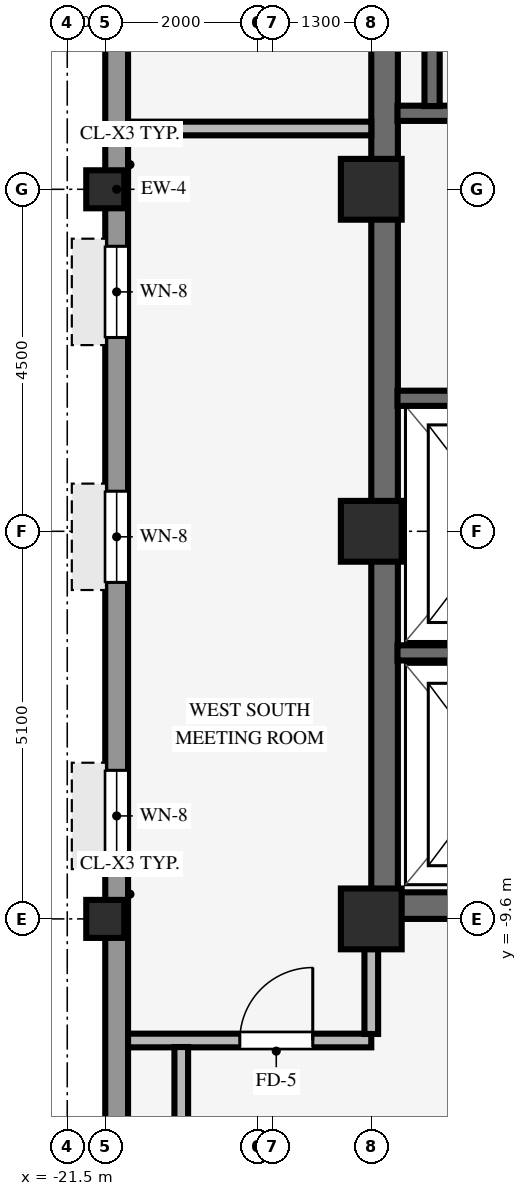
"""IFC4 building model, lengths in metres.
Left out: names, types, materials, properties, quantities, classifications, styles, units other than length and angle.
Written with IfcOpenShell. Run it as: python <this file> out.ifc"""

import sys

from ifc_helpers import new_model, si_unit, direction, frame, frame_2d, origin, origin_2d, place, context, subcontext, project, spatial, rectangle, hollow_rectangle, extrude, source, transform, mapped, element, fill, save


model = new_model("IFC4")
c1 = context("Model", 3, precision=1e-05, world=origin(), true_north=direction((0.0, 1.0)))
c2 = subcontext(c1, "Body", "Model", "MODEL_VIEW")
j1 = project(units=[si_unit("LENGTHUNIT", "METRE"), si_unit("PLANEANGLEUNIT", "RADIAN")], contexts=[c1])
p1 = place(None, origin())
s1 = spatial("IfcSite", under=j1, at=p1, CompositionType="ELEMENT")
p2 = place(p1, origin())
s2 = spatial("IfcBuilding", under=s1, at=p2, CompositionType="ELEMENT")
p3 = place(p2, frame((0.0, 0.0, 279.85)))
s3 = spatial("IfcBuildingStorey", under=s2, at=p3, CompositionType="ELEMENT", Elevation=279.85)
p4 = place(p3, frame((-17.5, -9.425, 0.0), z_axis=(0.0, 0.0, 1.0), x_axis=(1.0, 0.0, 0.0)))
e1 = element("IfcWall", 1, at=p4, inside=s3, PredefinedType="SHEAR", context=c2, shape_type="SweptSolid", body=[
    extrude(rectangle(XDim=8.5, YDim=0.35, at=frame_2d((4.25, 0.0))), origin(), (0.0, 0.0, 1.0), 3.37),
])
p5 = place(p3, frame((-17.325, -9.255, 0.0), z_axis=(0.0, 0.0, 1.0), x_axis=(0.0, 1.0, 0.0)))
e2 = element("IfcWall", 2, at=p5, inside=s3, PredefinedType="SHEAR", context=c2, shape_type="SweptSolid", body=[
    extrude(rectangle(XDim=18.51, YDim=0.35, at=frame_2d((9.255, 0.0))), origin(), (0.0, 0.0, 1.0), 3.37),
])
for number, where, z_axis, x_axis in (
    (3, (-17.5, -9.6, 0.0), (0.0, 0.0, 1.0), (1.0, 0.0, 0.0)),
    (4, (-17.5, -4.5, 0.0), (0.0, 0.0, 1.0), (1.0, 0.0, 0.0)),
    (5, (-17.5, 0.0, 0.0), (0.0, 0.0, 1.0), (1.0, 0.0, 0.0)),
):
    element("IfcColumn", number, at=place(p3, frame(where, z_axis=z_axis, x_axis=x_axis)), inside=s3, PredefinedType="COLUMN", context=c2, shape_type="SweptSolid", body=[
        extrude(rectangle(XDim=0.8, YDim=0.8, at=origin_2d()), origin(), (0.0, 0.0, 1.0), 3.37),
    ])
for number, where, z_axis, x_axis in (
    (6, (-21.0, -9.6, 0.0), (0.0, 0.0, 1.0), (1.0, 0.0, 0.0)),
    (7, (-21.0, 0.0, 0.0), (0.0, 0.0, 1.0), (1.0, 0.0, 0.0)),
):
    element("IfcColumn", number, at=place(p3, frame(where, z_axis=z_axis, x_axis=x_axis)), inside=s3, PredefinedType="COLUMN", context=c2, shape_type="SweptSolid", body=[
        extrude(hollow_rectangle(XDim=0.5, YDim=0.5, WallThickness=0.032, InnerFilletRadius=0.032, OuterFilletRadius=0.064, at=origin_2d()), origin(), (0.0, 0.0, 1.0), 3.37),
    ])
p6 = place(p3, frame((-20.85, -17.004, 0.0), z_axis=(0.0, 0.0, 1.0), x_axis=(0.0, 1.0, 0.0)))
e8 = element("IfcWall", 8, at=p6, inside=s3, PredefinedType="STANDARD", context=c2, shape_type="SweptSolid", body=[
    extrude(rectangle(XDim=34.008, YDim=0.3, at=frame_2d((17.004, 0.0))), origin(), (0.0, 0.0, 1.0), 2.705),
])
p7 = place(p6, frame((1.786, 0.0, 0.8)))
e9 = element("IfcOpeningElement", 9, at=p7, cuts=e8, PredefinedType="OPENING", context=c2, shape_type="SweptSolid", body=[
    extrude(rectangle(XDim=1.2, YDim=1.48, at=frame_2d((0.6, 0.74))), frame((0.0, 0.16, 0.0), z_axis=(0.0, -1.0, 0.0), x_axis=(1.0, 0.0, 0.0)), (0.0, 0.0, 1.0), 0.32),
])
p8 = place(p6, frame((8.159, 0.0, 0.8)))
e10 = element("IfcOpeningElement", 10, at=p8, cuts=e8, PredefinedType="OPENING", context=c2, shape_type="SweptSolid", body=[
    extrude(rectangle(XDim=1.2, YDim=1.48, at=frame_2d((0.6, 0.74))), frame((0.0, 0.16, 0.0), z_axis=(0.0, -1.0, 0.0), x_axis=(1.0, 0.0, 0.0)), (0.0, 0.0, 1.0), 0.32),
])
p9 = place(p6, frame((11.831, 0.0, 0.8)))
e11 = element("IfcOpeningElement", 11, at=p9, cuts=e8, PredefinedType="OPENING", context=c2, shape_type="SweptSolid", body=[
    extrude(rectangle(XDim=1.2, YDim=1.48, at=frame_2d((0.6, 0.74))), frame((0.0, 0.16, 0.0), z_axis=(0.0, -1.0, 0.0), x_axis=(1.0, 0.0, 0.0)), (0.0, 0.0, 1.0), 0.32),
])
p10 = place(p6, frame((15.054, 0.0, 0.8)))
e12 = element("IfcOpeningElement", 12, at=p10, cuts=e8, PredefinedType="OPENING", context=c2, shape_type="SweptSolid", body=[
    extrude(rectangle(XDim=1.2, YDim=1.48, at=frame_2d((0.6, 0.74))), frame((0.0, 0.16, 0.0), z_axis=(0.0, -1.0, 0.0), x_axis=(1.0, 0.0, 0.0)), (0.0, 0.0, 1.0), 0.32),
])
p11 = place(p6, frame((20.977, 0.0, 0.8)))
e13 = element("IfcOpeningElement", 13, at=p11, cuts=e8, PredefinedType="OPENING", context=c2, shape_type="SweptSolid", body=[
    extrude(rectangle(XDim=1.2, YDim=1.48, at=frame_2d((0.6, 0.74))), frame((0.0, 0.16, 0.0), z_axis=(0.0, -1.0, 0.0), x_axis=(1.0, 0.0, 0.0)), (0.0, 0.0, 1.0), 0.32),
])
p12 = place(p6, frame((24.649, 0.0, 0.8)))
e14 = element("IfcOpeningElement", 14, at=p12, cuts=e8, PredefinedType="OPENING", context=c2, shape_type="SweptSolid", body=[
    extrude(rectangle(XDim=1.2, YDim=1.48, at=frame_2d((0.6, 0.74))), frame((0.0, 0.16, 0.0), z_axis=(0.0, -1.0, 0.0), x_axis=(1.0, 0.0, 0.0)), (0.0, 0.0, 1.0), 0.32),
])
p13 = place(p6, frame((31.022, 0.0, 0.8)))
e15 = element("IfcOpeningElement", 15, at=p13, cuts=e8, PredefinedType="OPENING", context=c2, shape_type="SweptSolid", body=[
    extrude(rectangle(XDim=1.2, YDim=1.48, at=frame_2d((0.6, 0.74))), frame((0.0, 0.16, 0.0), z_axis=(0.0, -1.0, 0.0), x_axis=(1.0, 0.0, 0.0)), (0.0, 0.0, 1.0), 0.32),
])
p14 = place(p3, frame((-17.155, 1.0, 0.0), z_axis=(0.0, 0.0, 1.0), x_axis=(1.0, 0.0, 0.0)))
e16 = element("IfcWall", 16, at=p14, inside=s3, PredefinedType="SHEAR", context=c2, shape_type="SweptSolid", body=[
    extrude(rectangle(XDim=3.62, YDim=0.2, at=frame_2d((1.81, 0.0))), origin(), (0.0, 0.0, 1.0), 3.37),
])
p15 = place(p3, frame((-16.7, 1.095, 0.0), z_axis=(0.0, 0.0, 1.0), x_axis=(0.0, 1.0, 0.0)))
e17 = element("IfcWall", 17, at=p15, inside=s3, PredefinedType="SHEAR", context=c2, shape_type="SweptSolid", body=[
    extrude(rectangle(XDim=8.16, YDim=0.2, at=frame_2d((4.08, 0.0))), origin(), (0.0, 0.0, 1.0), 3.37),
])
p16 = place(p3, frame((-17.155, -6.1, 0.0), z_axis=(0.0, 0.0, 1.0), x_axis=(1.0, 0.0, 0.0)))
e18 = element("IfcWall", 18, at=p16, inside=s3, PredefinedType="SHEAR", context=c2, shape_type="SweptSolid", body=[
    extrude(rectangle(XDim=2.905, YDim=0.2, at=frame_2d((1.453, 0.0))), origin(), (0.0, 0.0, 1.0), 3.37),
])
p17 = place(p3, frame((-17.155, -2.75, 0.0), z_axis=(0.0, 0.0, 1.0), x_axis=(1.0, 0.0, 0.0)))
e19 = element("IfcWall", 19, at=p17, inside=s3, PredefinedType="SHEAR", context=c2, shape_type="SweptSolid", body=[
    extrude(rectangle(XDim=2.71, YDim=0.2, at=frame_2d((1.355, 0.0))), origin(), (0.0, 0.0, 1.0), 3.37),
])
p18 = place(p3, frame((-20.7, -11.2, 0.0), z_axis=(0.0, 0.0, 1.0), x_axis=(1.0, 0.0, 0.0)))
e20 = element("IfcWall", 20, at=p18, inside=s3, PredefinedType="PARTITIONING", context=c2, shape_type="SweptSolid", body=[
    extrude(rectangle(XDim=3.2, YDim=0.18, at=frame_2d((1.6, 0.0))), origin(), (0.0, 0.0, 1.0), 3.36),
])
p19 = place(p18, frame((1.47, 0.0, 0.0)))
e21 = element("IfcOpeningElement", 21, at=p19, cuts=e20, PredefinedType="OPENING", context=c2, shape_type="SweptSolid", body=[
    extrude(rectangle(XDim=0.96, YDim=2.1, at=frame_2d((0.48, 1.05))), frame((0.0, 0.1, 0.0), z_axis=(0.0, -1.0, 0.0), x_axis=(1.0, 0.0, 0.0)), (0.0, 0.0, 1.0), 0.2),
])
p20 = place(p3, frame((-20.7, 0.8, 0.0), z_axis=(0.0, 0.0, 1.0), x_axis=(1.0, 0.0, 0.0)))
e22 = element("IfcWall", 22, at=p20, inside=s3, PredefinedType="PARTITIONING", context=c2, shape_type="SweptSolid", body=[
    extrude(rectangle(XDim=3.2, YDim=0.18, at=frame_2d((1.6, 0.0))), origin(), (0.0, 0.0, 1.0), 3.36),
])
p21 = place(p3, frame((-20.0, -13.514, 0.0), z_axis=(0.0, 0.0, 1.0), x_axis=(0.0, 1.0, 0.0)))
e23 = element("IfcWall", 23, at=p21, inside=s3, PredefinedType="PARTITIONING", context=c2, shape_type="SweptSolid", body=[
    extrude(rectangle(XDim=2.228, YDim=0.18, at=frame_2d((1.114, 0.0))), origin(), (0.0, 0.0, 1.0), 3.36),
])
p22 = place(p3, frame((-17.5, -11.114, 0.0), z_axis=(0.0, 0.0, 1.0), x_axis=(0.0, 1.0, 0.0)))
e24 = element("IfcWall", 24, at=p22, inside=s3, PredefinedType="PARTITIONING", context=c2, shape_type="SweptSolid", body=[
    extrude(rectangle(XDim=1.118, YDim=0.18, at=frame_2d((0.559, 0.0))), origin(), (0.0, 0.0, 1.0), 2.892),
])
m1 = source(origin(), c2, "Body", "SweptSolid", [
    extrude(rectangle(XDim=1.2, YDim=1.48, at=frame_2d((0.6, 0.74))), frame((0.0, 0.03, 0.0), z_axis=(0.0, -1.0, 0.0), x_axis=(1.0, 0.0, 0.0)), (0.0, 0.0, 1.0), 0.06),
])
p23 = place(p8, origin())
e25 = element("IfcWindow", 25, at=p23, inside=s3, PartitioningType="SINGLE_PANEL", PredefinedType="WINDOW", context=c2, shape_type="MappedRepresentation", body=[
    mapped(m1, transform((0.0, 0.0, 0.0), scale=1.0)),
])
fill(e10, e25)
p24 = place(p9, origin())
e26 = element("IfcWindow", 26, at=p24, inside=s3, PartitioningType="SINGLE_PANEL", PredefinedType="WINDOW", context=c2, shape_type="MappedRepresentation", body=[
    mapped(m1, transform((0.0, 0.0, 0.0), scale=1.0)),
])
fill(e11, e26)
p25 = place(p10, origin())
e27 = element("IfcWindow", 27, at=p25, inside=s3, PartitioningType="SINGLE_PANEL", PredefinedType="WINDOW", context=c2, shape_type="MappedRepresentation", body=[
    mapped(m1, transform((0.0, 0.0, 0.0), scale=1.0)),
])
fill(e12, e27)
m2 = source(origin(), c2, "Body", "SweptSolid", [
    extrude(rectangle(XDim=0.96, YDim=2.1, at=frame_2d((0.48, 1.05))), frame((0.0, 0.025, 0.0), z_axis=(0.0, -1.0, 0.0), x_axis=(1.0, 0.0, 0.0)), (0.0, 0.0, 1.0), 0.05),
])
p26 = place(p19, origin())
e28 = element("IfcDoor", 28, at=p26, inside=s3, OperationType="SINGLE_SWING_RIGHT", PredefinedType="DOOR", context=c2, shape_type="MappedRepresentation", body=[
    mapped(m2, transform((0.0, 0.0, 0.0), scale=1.0)),
])
fill(e21, e28)
save(model, sys.argv[1])
